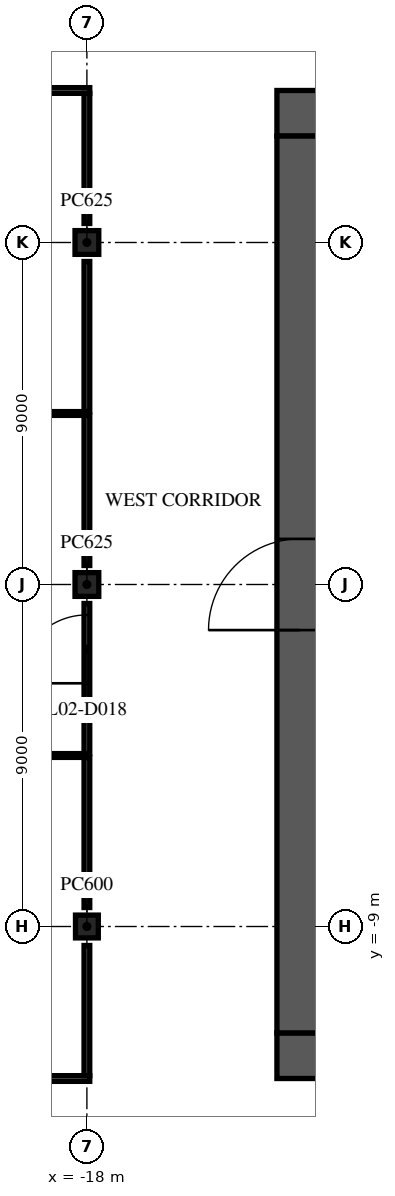
"""IFC4 building model, lengths in metres.
Left out: names, types, materials, properties, quantities, classifications, styles, units other than length and angle.
Written with IfcOpenShell. Run it as: python <this file> out.ifc"""

import sys

from ifc_helpers import new_model, si_unit, direction, frame, frame_2d, origin, origin_2d, place, context, subcontext, project, spatial, rectangle, extrude, element, fill, save


model = new_model("IFC4")
c1 = context("Model", 3, precision=1e-05, world=origin(), true_north=direction((0.0, 1.0)))
c2 = subcontext(c1, "Body", "Model", "MODEL_VIEW")
j1 = project(units=[si_unit("LENGTHUNIT", "METRE"), si_unit("PLANEANGLEUNIT", "RADIAN")], contexts=[c1])
p1 = place(None, origin())
s1 = spatial("IfcSite", under=j1, at=p1, CompositionType="ELEMENT")
p2 = place(p1, origin())
s2 = spatial("IfcBuilding", under=s1, at=p2, CompositionType="ELEMENT")
p3 = place(p2, frame((0.0, 0.0, 9.0)))
s3 = spatial("IfcBuildingStorey", under=s2, at=p3, CompositionType="ELEMENT", Elevation=9.0)
p4 = place(p3, frame((-18.0, -9.0, 0.0), z_axis=(0.0, 0.0, 1.0), x_axis=(1.0, 0.0, 0.0)))
e1 = element("IfcColumn", 1, at=p4, inside=s3, PredefinedType="COLUMN", context=c2, shape_type="SweptSolid", body=[
    extrude(rectangle(XDim=0.6, YDim=0.6, at=origin_2d()), origin(), (0.0, 0.0, 1.0), 4.5),
])
for number, where, z_axis, x_axis in (
    (2, (-18.0, 0.0, 0.0), (0.0, 0.0, 1.0), (1.0, 0.0, 0.0)),
    (3, (-18.0, 9.0, 0.0), (0.0, 0.0, 1.0), (1.0, 0.0, 0.0)),
):
    element("IfcColumn", number, at=place(p3, frame(where, z_axis=z_axis, x_axis=x_axis)), inside=s3, PredefinedType="COLUMN", context=c2, shape_type="SweptSolid", body=[
        extrude(rectangle(XDim=0.625, YDim=0.625, at=origin_2d()), origin(), (0.0, 0.0, 1.0), 4.5),
    ])
p5 = place(p3, frame((-13.0, 12.4, 0.0), z_axis=(0.0, 0.0, 1.0), x_axis=(1.0, 0.0, 0.0)))
e4 = element("IfcWall", 4, at=p5, inside=s3, PredefinedType="SHEAR", context=c2, shape_type="SweptSolid", body=[
    extrude(rectangle(XDim=26.0, YDim=1.2, at=frame_2d((13.0, 0.0))), origin(), (0.0, 0.0, 1.0), 4.1),
])
p6 = place(p5, frame((11.8, 0.0, 0.0)))
e5 = element("IfcOpeningElement", 5, at=p6, cuts=e4, PredefinedType="OPENING", context=c2, shape_type="SweptSolid", body=[
    extrude(rectangle(XDim=2.4, YDim=2.4, at=frame_2d((1.2, 1.2))), frame((0.0, 0.61, 0.0), z_axis=(0.0, -1.0, 0.0), x_axis=(1.0, 0.0, 0.0)), (0.0, 0.0, 1.0), 1.22),
])
p7 = place(p5, frame((22.625, 0.0, 0.0)))
e6 = element("IfcOpeningElement", 6, at=p7, cuts=e4, PredefinedType="OPENING", context=c2, shape_type="SweptSolid", body=[
    extrude(rectangle(XDim=1.2, YDim=2.1, at=frame_2d((0.6, 1.05))), frame((0.0, 0.61, 0.0), z_axis=(0.0, -1.0, 0.0), x_axis=(1.0, 0.0, 0.0)), (0.0, 0.0, 1.0), 1.22),
])
p8 = place(p5, frame((1.6, 0.0, 0.0)))
e7 = element("IfcOpeningElement", 7, at=p8, cuts=e4, PredefinedType="OPENING", context=c2, shape_type="SweptSolid", body=[
    extrude(rectangle(XDim=1.0, YDim=2.1, at=frame_2d((0.5, 1.05))), frame((0.0, 0.61, 0.0), z_axis=(0.0, -1.0, 0.0), x_axis=(1.0, 0.0, 0.0)), (0.0, 0.0, 1.0), 1.22),
])
p9 = place(p3, frame((-13.0, -12.4, 0.0), z_axis=(0.0, 0.0, 1.0), x_axis=(1.0, 0.0, 0.0)))
e8 = element("IfcWall", 8, at=p9, inside=s3, PredefinedType="SHEAR", context=c2, shape_type="SweptSolid", body=[
    extrude(rectangle(XDim=26.0, YDim=1.2, at=frame_2d((13.0, 0.0))), origin(), (0.0, 0.0, 1.0), 4.1),
])
p10 = place(p9, frame((7.9, 0.0, 0.0)))
e9 = element("IfcOpeningElement", 9, at=p10, cuts=e8, PredefinedType="OPENING", context=c2, shape_type="SweptSolid", body=[
    extrude(rectangle(XDim=2.0, YDim=2.1, at=frame_2d((1.0, 1.05))), frame((0.0, 0.61, 0.0), z_axis=(0.0, -1.0, 0.0), x_axis=(1.0, 0.0, 0.0)), (0.0, 0.0, 1.0), 1.22),
])
p11 = place(p9, frame((18.025, 0.0, 0.0)))
e10 = element("IfcOpeningElement", 10, at=p11, cuts=e8, PredefinedType="OPENING", context=c2, shape_type="SweptSolid", body=[
    extrude(rectangle(XDim=1.2, YDim=2.1, at=frame_2d((0.6, 1.05))), frame((0.0, 0.61, 0.0), z_axis=(0.0, -1.0, 0.0), x_axis=(1.0, 0.0, 0.0)), (0.0, 0.0, 1.0), 1.22),
])
p12 = place(p9, frame((2.175, 0.0, 0.0)))
e11 = element("IfcOpeningElement", 11, at=p12, cuts=e8, PredefinedType="OPENING", context=c2, shape_type="SweptSolid", body=[
    extrude(rectangle(XDim=1.2, YDim=2.1, at=frame_2d((0.6, 1.05))), frame((0.0, 0.61, 0.0), z_axis=(0.0, -1.0, 0.0), x_axis=(1.0, 0.0, 0.0)), (0.0, 0.0, 1.0), 1.22),
])
p13 = place(p9, frame((22.625, 0.0, 0.0)))
e12 = element("IfcOpeningElement", 12, at=p13, cuts=e8, PredefinedType="OPENING", context=c2, shape_type="SweptSolid", body=[
    extrude(rectangle(XDim=1.2, YDim=2.1, at=frame_2d((0.6, 1.05))), frame((0.0, 0.61, 0.0), z_axis=(0.0, -1.0, 0.0), x_axis=(1.0, 0.0, 0.0)), (0.0, 0.0, 1.0), 1.22),
])
p14 = place(p3, frame((-12.4, -11.8, 0.0), z_axis=(0.0, 0.0, 1.0), x_axis=(0.0, 1.0, 0.0)))
e13 = element("IfcWall", 13, at=p14, inside=s3, PredefinedType="SHEAR", context=c2, shape_type="SweptSolid", body=[
    extrude(rectangle(XDim=23.6, YDim=1.2, at=frame_2d((11.8, 0.0))), origin(), (0.0, 0.0, 1.0), 4.1),
])
p15 = place(p14, frame((10.6, 0.0, 0.0)))
e14 = element("IfcOpeningElement", 14, at=p15, cuts=e13, PredefinedType="OPENING", context=c2, shape_type="SweptSolid", body=[
    extrude(rectangle(XDim=2.4, YDim=2.4, at=frame_2d((1.2, 1.2))), frame((0.0, 0.61, 0.0), z_axis=(0.0, -1.0, 0.0), x_axis=(1.0, 0.0, 0.0)), (0.0, 0.0, 1.0), 1.22),
])
p16 = place(p3, frame((-36.0, -13.0, 0.0), z_axis=(0.0, 0.0, 1.0), x_axis=(1.0, 0.0, 0.0)))
e15 = element("IfcWall", 15, at=p16, inside=s3, PredefinedType="PARTITIONING", context=c2, shape_type="SweptSolid", body=[
    extrude(rectangle(XDim=18.075, YDim=0.15, at=frame_2d((9.038, 0.0))), origin(), (0.0, 0.0, 1.0), 4.1),
])
p17 = place(p16, frame((8.5, 0.0, 0.0)))
e16 = element("IfcOpeningElement", 16, at=p17, cuts=e15, PredefinedType="OPENING", context=c2, shape_type="SweptSolid", body=[
    extrude(rectangle(XDim=1.0, YDim=2.1, at=frame_2d((0.5, 1.05))), frame((0.0, 0.085, 0.0), z_axis=(0.0, -1.0, 0.0), x_axis=(1.0, 0.0, 0.0)), (0.0, 0.0, 1.0), 0.17),
])
for number, where, z_axis, x_axis in (
    (17, (-36.0, -4.5, 0.0), (0.0, 0.0, 1.0), (1.0, 0.0, 0.0)),
    (18, (-36.0, 4.5, 0.0), (0.0, 0.0, 1.0), (1.0, 0.0, 0.0)),
):
    element("IfcWall", number, at=place(p3, frame(where, z_axis=z_axis, x_axis=x_axis)), inside=s3, PredefinedType="PARTITIONING", context=c2, shape_type="SweptSolid", body=[
        extrude(rectangle(XDim=17.925, YDim=0.1, at=frame_2d((8.962, 0.0))), origin(), (0.0, 0.0, 1.0), 4.1),
    ])
p18 = place(p3, frame((-36.0, 13.0, 0.0), z_axis=(0.0, 0.0, 1.0), x_axis=(1.0, 0.0, 0.0)))
e19 = element("IfcWall", 19, at=p18, inside=s3, PredefinedType="PARTITIONING", context=c2, shape_type="SweptSolid", body=[
    extrude(rectangle(XDim=18.075, YDim=0.15, at=frame_2d((9.038, 0.0))), origin(), (0.0, 0.0, 1.0), 4.1),
])
p19 = place(p18, frame((8.5, 0.0, 0.0)))
e20 = element("IfcOpeningElement", 20, at=p19, cuts=e19, PredefinedType="OPENING", context=c2, shape_type="SweptSolid", body=[
    extrude(rectangle(XDim=1.0, YDim=2.1, at=frame_2d((0.5, 1.05))), frame((0.0, 0.085, 0.0), z_axis=(0.0, -1.0, 0.0), x_axis=(1.0, 0.0, 0.0)), (0.0, 0.0, 1.0), 0.17),
])
p20 = place(p3, frame((-18.0, -12.925, 0.0), z_axis=(0.0, 0.0, 1.0), x_axis=(0.0, 1.0, 0.0)))
e21 = element("IfcWall", 21, at=p20, inside=s3, PredefinedType="PARTITIONING", context=c2, shape_type="SweptSolid", body=[
    extrude(rectangle(XDim=3.425, YDim=0.15, at=frame_2d((1.712, 0.0))), origin(), (0.0, 0.0, 1.0), 4.1),
])
p21 = place(p3, frame((-18.0, -8.5, 0.0), z_axis=(0.0, 0.0, 1.0), x_axis=(0.0, 1.0, 0.0)))
e22 = element("IfcWall", 22, at=p21, inside=s3, PredefinedType="PARTITIONING", context=c2, shape_type="SweptSolid", body=[
    extrude(rectangle(XDim=3.95, YDim=0.15, at=frame_2d((1.975, 0.0))), origin(), (0.0, 0.0, 1.0), 4.1),
])
p22 = place(p3, frame((-18.0, -4.45, 0.0), z_axis=(0.0, 0.0, 1.0), x_axis=(0.0, 1.0, 0.0)))
e23 = element("IfcWall", 23, at=p22, inside=s3, PredefinedType="PARTITIONING", context=c2, shape_type="SweptSolid", body=[
    extrude(rectangle(XDim=3.95, YDim=0.15, at=frame_2d((1.975, 0.0))), origin(), (0.0, 0.0, 1.0), 4.1),
])
p23 = place(p22, frame((1.85, 0.0, 0.0)))
e24 = element("IfcOpeningElement", 24, at=p23, cuts=e23, PredefinedType="OPENING", context=c2, shape_type="SweptSolid", body=[
    extrude(rectangle(XDim=1.8, YDim=2.1, at=frame_2d((0.9, 1.05))), frame((0.0, 0.085, 0.0), z_axis=(0.0, -1.0, 0.0), x_axis=(1.0, 0.0, 0.0)), (0.0, 0.0, 1.0), 0.17),
])
for number, where, z_axis, x_axis in (
    (25, (-18.0, 0.5, 0.0), (0.0, 0.0, 1.0), (0.0, 1.0, 0.0)),
    (26, (-18.0, 4.55, 0.0), (0.0, 0.0, 1.0), (0.0, 1.0, 0.0)),
):
    element("IfcWall", number, at=place(p3, frame(where, z_axis=z_axis, x_axis=x_axis)), inside=s3, PredefinedType="PARTITIONING", context=c2, shape_type="SweptSolid", body=[
        extrude(rectangle(XDim=3.95, YDim=0.15, at=frame_2d((1.975, 0.0))), origin(), (0.0, 0.0, 1.0), 4.1),
    ])
p24 = place(p3, frame((-18.0, 9.5, 0.0), z_axis=(0.0, 0.0, 1.0), x_axis=(0.0, 1.0, 0.0)))
e27 = element("IfcWall", 27, at=p24, inside=s3, PredefinedType="PARTITIONING", context=c2, shape_type="SweptSolid", body=[
    extrude(rectangle(XDim=3.425, YDim=0.15, at=frame_2d((1.712, 0.0))), origin(), (0.0, 0.0, 1.0), 4.1),
])
p25 = place(p15, origin())
e28 = element("IfcDoor", 28, at=p25, inside=s3, OperationType="SINGLE_SWING_LEFT", PredefinedType="DOOR", context=c2, shape_type="SweptSolid", body=[
    extrude(rectangle(XDim=2.4, YDim=2.4, at=frame_2d((1.2, 1.2))), frame((0.0, 0.025, 0.0), z_axis=(0.0, -1.0, 0.0), x_axis=(1.0, 0.0, 0.0)), (0.0, 0.0, 1.0), 0.05),
])
fill(e14, e28)
p26 = place(p23, origin())
e29 = element("IfcDoor", 29, at=p26, inside=s3, OperationType="DOUBLE_DOOR_SINGLE_SWING", PredefinedType="DOOR", context=c2, shape_type="SweptSolid", body=[
    extrude(rectangle(XDim=1.8, YDim=2.1, at=frame_2d((0.9, 1.05))), frame((0.0, 0.025, 0.0), z_axis=(0.0, -1.0, 0.0), x_axis=(1.0, 0.0, 0.0)), (0.0, 0.0, 1.0), 0.05),
])
fill(e24, e29)
save(model, sys.argv[1])
